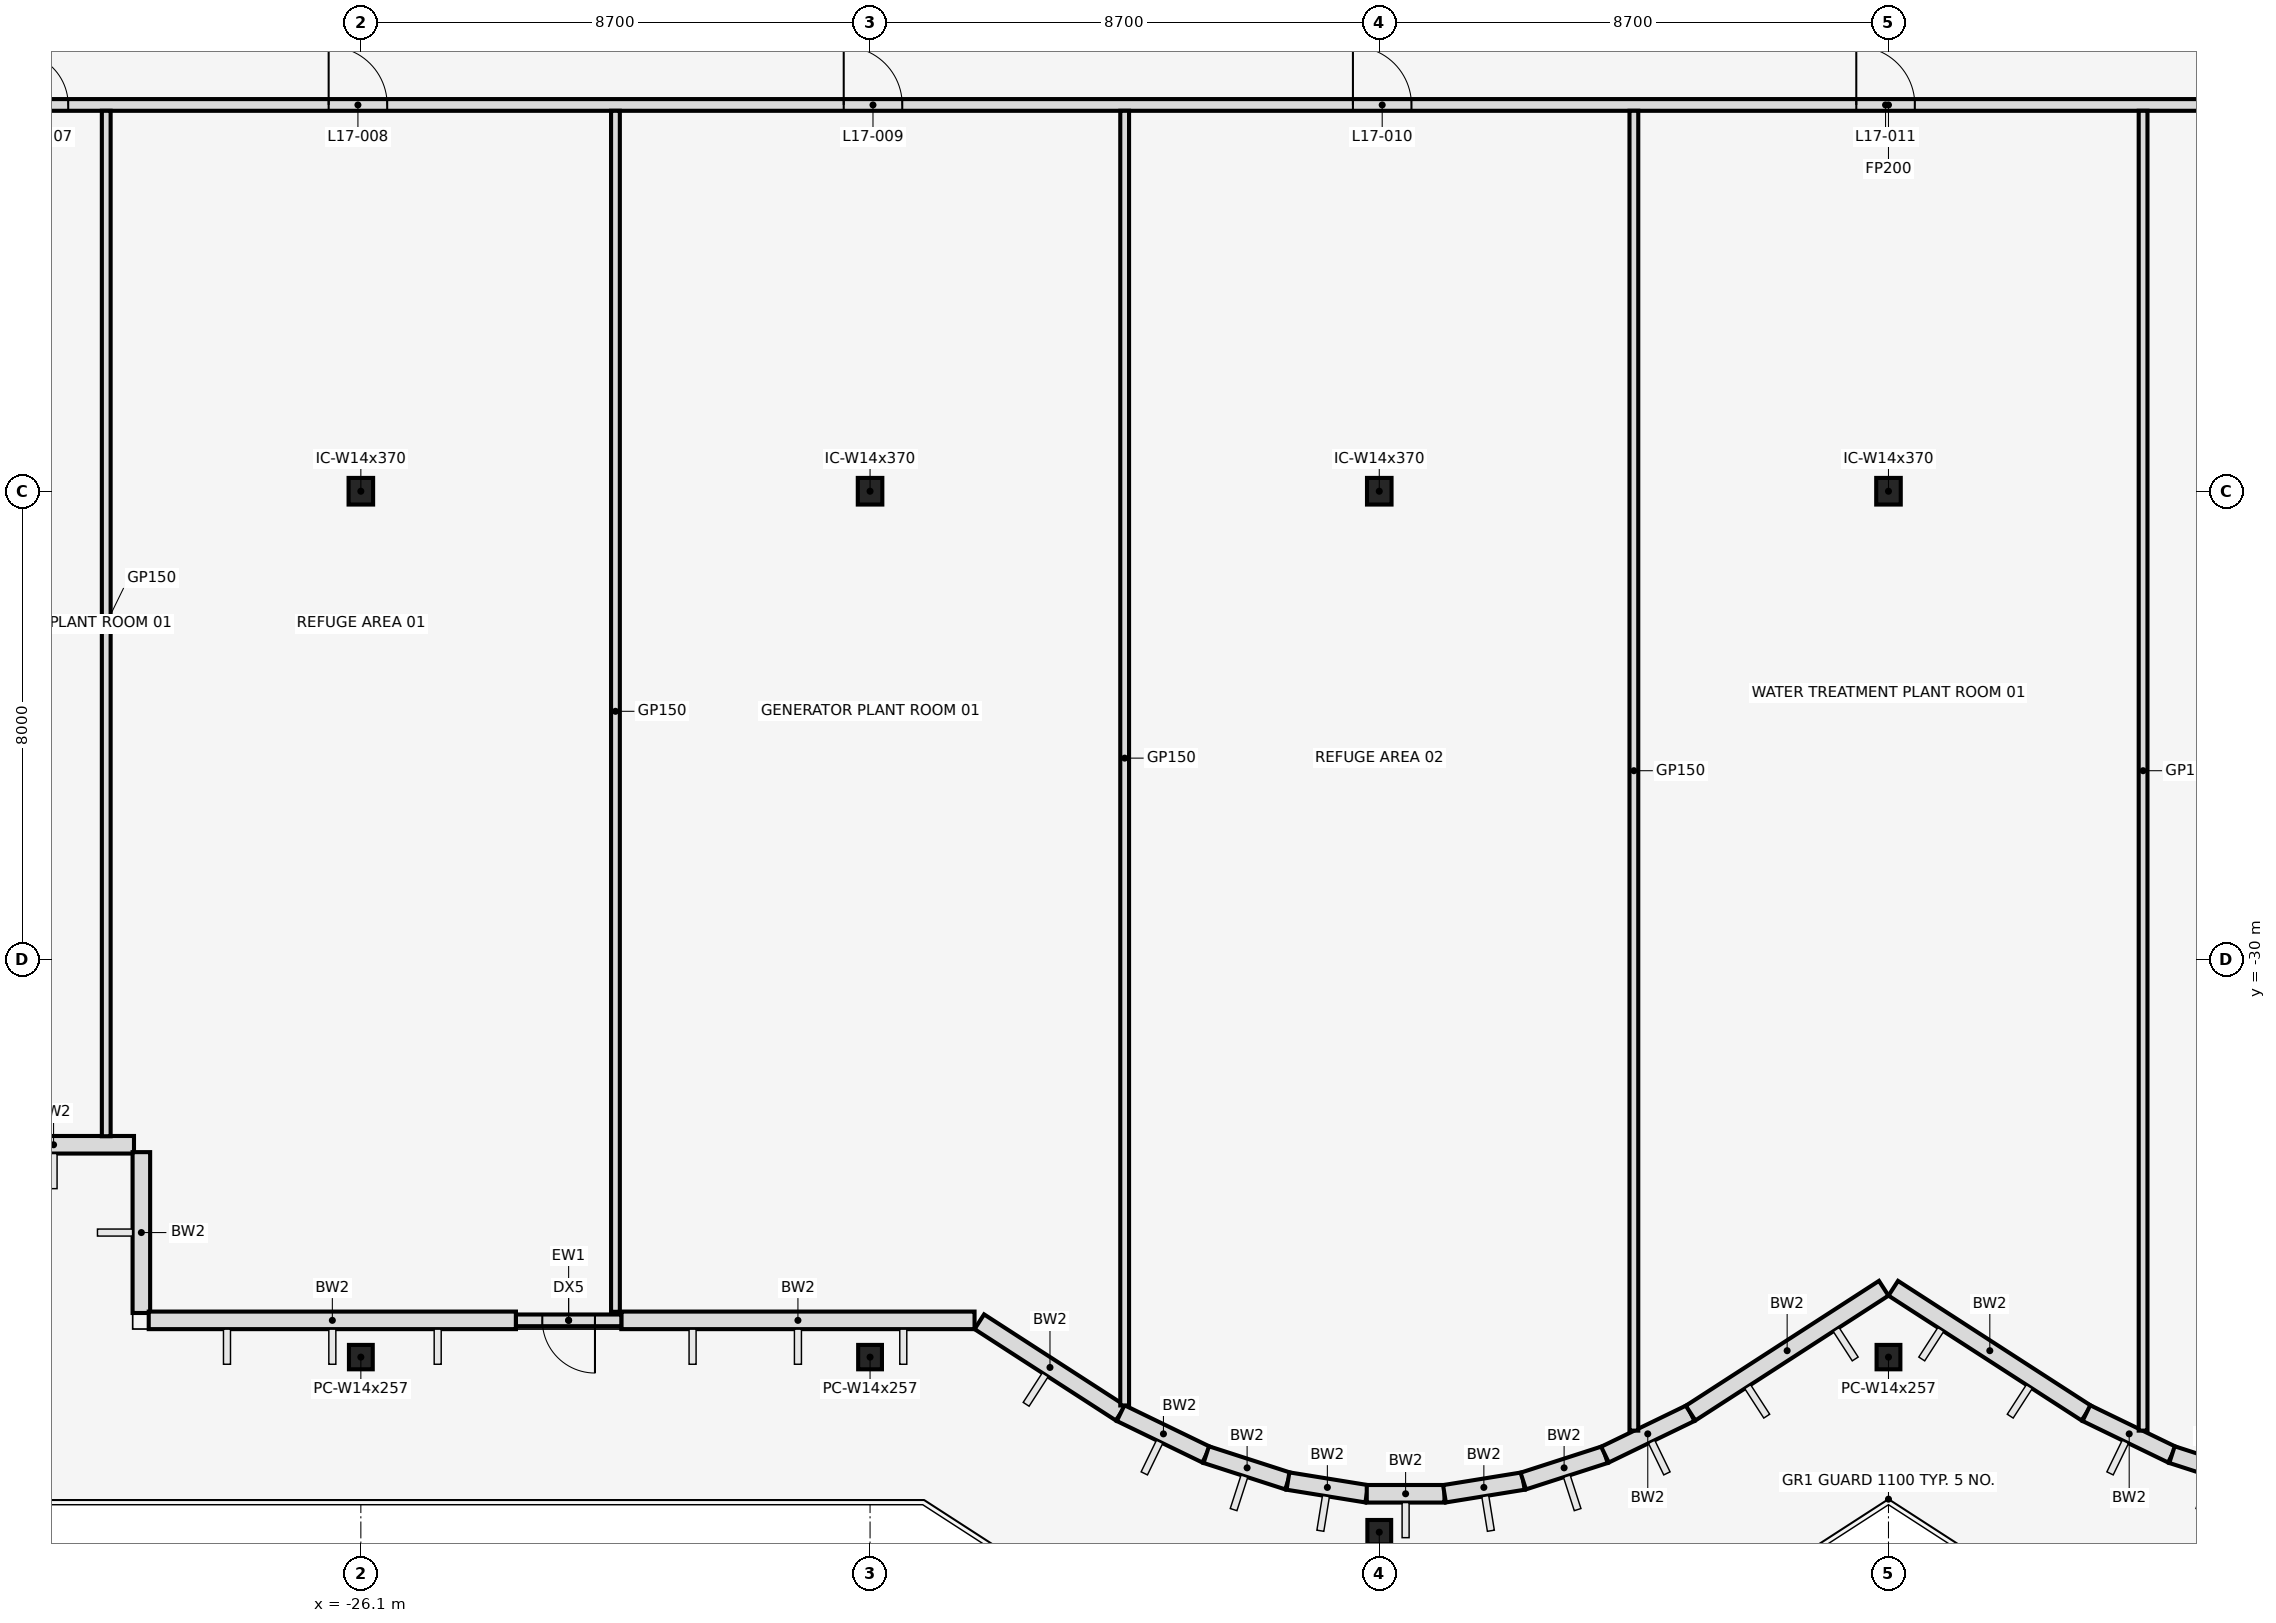
"""IFC4 building model, lengths in metres.
Left out: names, types, materials, properties, quantities, classifications, styles, units other than length and angle.
Written with IfcOpenShell. Run it as: python <this file> out.ifc"""

import sys

from ifc_helpers import new_model, si_unit, direction, frame, frame_2d, origin, origin_2d, place, context, subcontext, project, spatial, rectangle, i_section, extrude, element, fill, save


model = new_model("IFC4")
c1 = context("Model", 3, precision=1e-05, world=origin(), true_north=direction((0.0, 1.0)))
c2 = subcontext(c1, "Body", "Model", "MODEL_VIEW")
j1 = project(units=[si_unit("LENGTHUNIT", "METRE"), si_unit("PLANEANGLEUNIT", "RADIAN")], contexts=[c1])
p1 = place(None, origin())
s1 = spatial("IfcSite", under=j1, at=p1, CompositionType="ELEMENT")
p2 = place(p1, origin())
s2 = spatial("IfcBuilding", under=s1, at=p2, CompositionType="ELEMENT")
p3 = place(p2, frame((0.0, 0.0, 84.5)))
s3 = spatial("IfcBuildingStorey", under=s2, at=p3, CompositionType="ELEMENT", Elevation=84.5)
for number, where, z_axis, x_axis in (
    (1, (-26.1, -36.794, 0.0), (0.0, 0.0, 1.0), (1.0, 0.0, 0.0)),
    (2, (-17.4, -36.794, 0.0), (0.0, 0.0, 1.0), (1.0, 0.0, 0.0)),
    (3, (-8.7, -39.785, 0.0), (0.0, 0.0, 1.0), (1.0, 0.0, 0.0)),
    (4, (0.0, -36.794, 0.0), (0.0, 0.0, 1.0), (1.0, 0.0, 0.0)),
):
    element("IfcColumn", number, at=place(p3, frame(where, z_axis=z_axis, x_axis=x_axis)), inside=s3, PredefinedType="COLUMN", context=c2, shape_type="SweptSolid", body=[
        extrude(i_section(OverallWidth=0.406, OverallDepth=0.417, WebThickness=0.03, FlangeThickness=0.048, at=origin_2d()), origin(), (0.0, 0.0, 1.0), 5.4),
    ])
for number, where, z_axis, x_axis in (
    (5, (-26.1, -22.0, 0.0), (0.0, 0.0, 1.0), (1.0, 0.0, 0.0)),
    (6, (-17.4, -22.0, 0.0), (0.0, 0.0, 1.0), (1.0, 0.0, 0.0)),
    (7, (-8.7, -22.0, 0.0), (0.0, 0.0, 1.0), (1.0, 0.0, 0.0)),
    (8, (0.0, -22.0, 0.0), (0.0, 0.0, 1.0), (1.0, 0.0, 0.0)),
):
    element("IfcColumn", number, at=place(p3, frame(where, z_axis=z_axis, x_axis=x_axis)), inside=s3, PredefinedType="COLUMN", context=c2, shape_type="SweptSolid", body=[
        extrude(i_section(OverallWidth=0.419, OverallDepth=0.455, WebThickness=0.042, FlangeThickness=0.068, at=origin_2d()), origin(), (0.0, 0.0, 1.0), 5.4),
    ])
p4 = place(p3, frame((-32.724, -33.166, 0.0), z_axis=(0.0, 0.0, 1.0), x_axis=(1.0, 0.0, 0.0)))
e9 = element("IfcWall", 9, at=p4, inside=s3, PredefinedType="STANDARD", context=c2, shape_type="SweptSolid", body=[
    extrude(rectangle(XDim=2.748, YDim=0.3, at=frame_2d((1.374, 0.0))), origin(), (0.0, 0.0, 1.0), 4.572),
])
p5 = place(p3, frame((-29.85, -33.292, 0.0), z_axis=(0.0, 0.0, 1.0), x_axis=(0.0, -1.0, 0.0)))
e10 = element("IfcWall", 10, at=p5, inside=s3, PredefinedType="STANDARD", context=c2, shape_type="SweptSolid", body=[
    extrude(rectangle(XDim=2.748, YDim=0.3, at=frame_2d((1.374, 0.0))), origin(), (0.0, 0.0, 1.0), 4.572),
])
p6 = place(p3, frame((-29.724, -36.166, 0.0), z_axis=(0.0, 0.0, 1.0), x_axis=(1.0, 0.0, 0.0)))
e11 = element("IfcWall", 11, at=p6, inside=s3, PredefinedType="STANDARD", context=c2, shape_type="SweptSolid", body=[
    extrude(rectangle(XDim=6.274, YDim=0.3, at=frame_2d((3.137, 0.0))), origin(), (0.0, 0.0, 1.0), 4.572),
])
p7 = place(p3, frame((-21.65, -36.166, 0.0), z_axis=(0.0, 0.0, 1.0), x_axis=(1.0, 0.0, 0.0)))
e12 = element("IfcWall", 12, at=p7, inside=s3, PredefinedType="STANDARD", context=c2, shape_type="SweptSolid", body=[
    extrude(rectangle(XDim=6.035, YDim=0.3, at=frame_2d((3.018, 0.0))), origin(), (0.0, 0.0, 1.0), 4.572),
])
p8 = place(p3, frame((-15.533, -36.19, 0.0), z_axis=(0.0, 0.0, 1.0), x_axis=(0.839779682339, -0.542927329512, 0.0)))
e13 = element("IfcWall", 13, at=p8, inside=s3, PredefinedType="STANDARD", context=c2, shape_type="SweptSolid", body=[
    extrude(rectangle(XDim=2.875, YDim=0.3, at=frame_2d((1.438, 0.0))), origin(), (0.0, 0.0, 1.0), 4.496),
])
p9 = place(p3, frame((-13.119, -37.751, 0.0), z_axis=(0.0, 0.0, 1.0), x_axis=(0.899798026589, -0.436306671214, 0.0)))
e14 = element("IfcWall", 14, at=p9, inside=s3, PredefinedType="STANDARD", context=c2, shape_type="SweptSolid", body=[
    extrude(rectangle(XDim=1.625, YDim=0.3, at=frame_2d((0.813, 0.0))), origin(), (0.0, 0.0, 1.0), 4.496),
])
p10 = place(p3, frame((-11.656, -38.46, 0.0), z_axis=(0.0, 0.0, 1.0), x_axis=(0.951539081691, -0.307527845919, 0.0)))
e15 = element("IfcWall", 15, at=p10, inside=s3, PredefinedType="STANDARD", context=c2, shape_type="SweptSolid", body=[
    extrude(rectangle(XDim=1.467, YDim=0.3, at=frame_2d((0.733, 0.0))), origin(), (0.0, 0.0, 1.0), 5.25),
])
p11 = place(p3, frame((-10.26, -38.911, 0.0), z_axis=(0.0, 0.0, 1.0), x_axis=(0.987194777017, -0.15951950423, 0.0)))
e16 = element("IfcWall", 16, at=p11, inside=s3, PredefinedType="STANDARD", context=c2, shape_type="SweptSolid", body=[
    extrude(rectangle(XDim=1.364, YDim=0.3, at=frame_2d((0.682, 0.0))), origin(), (0.0, 0.0, 1.0), 4.414),
])
p12 = place(p3, frame((-8.914, -39.129, 0.0), z_axis=(0.0, 0.0, 1.0), x_axis=(1.0, 0.0, 0.0)))
e17 = element("IfcWall", 17, at=p12, inside=s3, PredefinedType="STANDARD", context=c2, shape_type="SweptSolid", body=[
    extrude(rectangle(XDim=1.328, YDim=0.3, at=frame_2d((0.664, 0.0))), origin(), (0.0, 0.0, 1.0), 4.414),
])
p13 = place(p3, frame((-7.586, -39.129, 0.0), z_axis=(0.0, 0.0, 1.0), x_axis=(0.987194777017, 0.15951950423, 0.0)))
e18 = element("IfcWall", 18, at=p13, inside=s3, PredefinedType="STANDARD", context=c2, shape_type="SweptSolid", body=[
    extrude(rectangle(XDim=1.364, YDim=0.3, at=frame_2d((0.682, 0.0))), origin(), (0.0, 0.0, 1.0), 5.25),
])
p14 = place(p3, frame((-6.24, -38.911, 0.0), z_axis=(0.0, 0.0, 1.0), x_axis=(0.951539081691, 0.307527845919, 0.0)))
e19 = element("IfcWall", 19, at=p14, inside=s3, PredefinedType="STANDARD", context=c2, shape_type="SweptSolid", body=[
    extrude(rectangle(XDim=1.467, YDim=0.3, at=frame_2d((0.733, 0.0))), origin(), (0.0, 0.0, 1.0), 5.25),
])
p15 = place(p3, frame((-4.844, -38.46, 0.0), z_axis=(0.0, 0.0, 1.0), x_axis=(0.899798026589, 0.436306671214, 0.0)))
e20 = element("IfcWall", 20, at=p15, inside=s3, PredefinedType="STANDARD", context=c2, shape_type="SweptSolid", body=[
    extrude(rectangle(XDim=1.625, YDim=0.3, at=frame_2d((0.813, 0.0))), origin(), (0.0, 0.0, 1.0), 4.496),
])
for number, where, z_axis, x_axis in (
    (21, (-3.381, -37.751, 0.0), (0.0, 0.0, 1.0), (0.84, 0.543, 0.0)),
    (22, (0.081, -35.618, 0.0), (0.0, 0.0, 1.0), (0.84, -0.543, 0.0)),
):
    element("IfcWall", number, at=place(p3, frame(where, z_axis=z_axis, x_axis=x_axis)), inside=s3, PredefinedType="STANDARD", context=c2, shape_type="SweptSolid", body=[
        extrude(rectangle(XDim=3.929, YDim=0.3, at=frame_2d((1.965, 0.0))), origin(), (0.0, 0.0, 1.0), 4.572),
    ])
p16 = place(p3, frame((3.381, -37.751, 0.0), z_axis=(0.0, 0.0, 1.0), x_axis=(0.899798026589, -0.436306671214, 0.0)))
e23 = element("IfcWall", 23, at=p16, inside=s3, PredefinedType="STANDARD", context=c2, shape_type="SweptSolid", body=[
    extrude(rectangle(XDim=1.625, YDim=0.3, at=frame_2d((0.813, 0.0))), origin(), (0.0, 0.0, 1.0), 4.496),
])
p17 = place(p3, frame((4.844, -38.46, 0.0), z_axis=(0.0, 0.0, 1.0), x_axis=(0.951539081691, -0.307527845919, 0.0)))
e24 = element("IfcWall", 24, at=p17, inside=s3, PredefinedType="STANDARD", context=c2, shape_type="SweptSolid", body=[
    extrude(rectangle(XDim=1.467, YDim=0.3, at=frame_2d((0.733, 0.0))), origin(), (0.0, 0.0, 1.0), 5.25),
])
p18 = place(p3, frame((-21.65, -36.166, 0.0), z_axis=(0.0, 0.0, 1.0), x_axis=(-1.0, 0.0, 0.0)))
e25 = element("IfcWall", 25, at=p18, inside=s3, PredefinedType="STANDARD", context=c2, shape_type="SweptSolid", body=[
    extrude(rectangle(XDim=1.8, YDim=0.2, at=frame_2d((0.9, 0.0))), origin(), (0.0, 0.0, 1.0), 5.25),
])
p19 = place(p18, frame((0.45, 0.0, 0.0)))
e26 = element("IfcOpeningElement", 26, at=p19, cuts=e25, PredefinedType="OPENING", context=c2, shape_type="SweptSolid", body=[
    extrude(rectangle(XDim=0.9, YDim=2.1, at=frame_2d((0.45, 1.05))), frame((0.0, 0.112, 0.0), z_axis=(0.0, -1.0, 0.0), x_axis=(1.0, 0.0, 0.0)), (0.0, 0.0, 1.0), 0.224),
])
p20 = place(p3, frame((-32.7, -15.4, 0.0), z_axis=(0.0, 0.0, 1.0), x_axis=(1.0, 0.0, 0.0)))
e27 = element("IfcWall", 27, at=p20, inside=s3, PredefinedType="PARTITIONING", context=c2, shape_type="SweptSolid", body=[
    extrude(rectangle(XDim=65.4, YDim=0.2, at=frame_2d((32.7, 0.0))), origin(), (0.0, 0.0, 1.0), 4.318),
])
p21 = place(p20, frame((0.7, 0.0, 0.0)))
e28 = element("IfcOpeningElement", 28, at=p21, cuts=e27, PredefinedType="OPENING", context=c2, shape_type="SweptSolid", body=[
    extrude(rectangle(XDim=0.9, YDim=2.1, at=frame_2d((0.45, 1.05))), frame((0.0, 0.112, 0.0), z_axis=(0.0, -1.0, 0.0), x_axis=(1.0, 0.0, 0.0)), (0.0, 0.0, 1.0), 0.224),
])
p22 = place(p20, frame((6.05, 0.0, 0.0)))
e29 = element("IfcOpeningElement", 29, at=p22, cuts=e27, PredefinedType="OPENING", context=c2, shape_type="SweptSolid", body=[
    extrude(rectangle(XDim=1.0, YDim=2.1, at=frame_2d((0.5, 1.05))), frame((0.0, 0.112, 0.0), z_axis=(0.0, -1.0, 0.0), x_axis=(1.0, 0.0, 0.0)), (0.0, 0.0, 1.0), 0.224),
])
p23 = place(p20, frame((14.85, 0.0, 0.0)))
e30 = element("IfcOpeningElement", 30, at=p23, cuts=e27, PredefinedType="OPENING", context=c2, shape_type="SweptSolid", body=[
    extrude(rectangle(XDim=1.0, YDim=2.1, at=frame_2d((0.5, 1.05))), frame((0.0, 0.112, 0.0), z_axis=(0.0, -1.0, 0.0), x_axis=(1.0, 0.0, 0.0)), (0.0, 0.0, 1.0), 0.224),
])
p24 = place(p20, frame((23.55, 0.0, 0.0)))
e31 = element("IfcOpeningElement", 31, at=p24, cuts=e27, PredefinedType="OPENING", context=c2, shape_type="SweptSolid", body=[
    extrude(rectangle(XDim=1.0, YDim=2.1, at=frame_2d((0.5, 1.05))), frame((0.0, 0.112, 0.0), z_axis=(0.0, -1.0, 0.0), x_axis=(1.0, 0.0, 0.0)), (0.0, 0.0, 1.0), 0.224),
])
p25 = place(p20, frame((32.15, 0.0, 0.0)))
e32 = element("IfcOpeningElement", 32, at=p25, cuts=e27, PredefinedType="OPENING", context=c2, shape_type="SweptSolid", body=[
    extrude(rectangle(XDim=1.0, YDim=2.1, at=frame_2d((0.5, 1.05))), frame((0.0, 0.112, 0.0), z_axis=(0.0, -1.0, 0.0), x_axis=(1.0, 0.0, 0.0)), (0.0, 0.0, 1.0), 0.224),
])
p26 = place(p20, frame((40.95, 0.0, 0.0)))
e33 = element("IfcOpeningElement", 33, at=p26, cuts=e27, PredefinedType="OPENING", context=c2, shape_type="SweptSolid", body=[
    extrude(rectangle(XDim=1.0, YDim=2.1, at=frame_2d((0.5, 1.05))), frame((0.0, 0.112, 0.0), z_axis=(0.0, -1.0, 0.0), x_axis=(1.0, 0.0, 0.0)), (0.0, 0.0, 1.0), 0.224),
])
p27 = place(p20, frame((49.65, 0.0, 0.0)))
e34 = element("IfcOpeningElement", 34, at=p27, cuts=e27, PredefinedType="OPENING", context=c2, shape_type="SweptSolid", body=[
    extrude(rectangle(XDim=0.9, YDim=2.1, at=frame_2d((0.45, 1.05))), frame((0.0, 0.112, 0.0), z_axis=(0.0, -1.0, 0.0), x_axis=(1.0, 0.0, 0.0)), (0.0, 0.0, 1.0), 0.224),
])
p28 = place(p20, frame((58.35, 0.0, 0.0)))
e35 = element("IfcOpeningElement", 35, at=p28, cuts=e27, PredefinedType="OPENING", context=c2, shape_type="SweptSolid", body=[
    extrude(rectangle(XDim=1.0, YDim=2.1, at=frame_2d((0.5, 1.05))), frame((0.0, 0.112, 0.0), z_axis=(0.0, -1.0, 0.0), x_axis=(1.0, 0.0, 0.0)), (0.0, 0.0, 1.0), 0.224),
])
p29 = place(p20, frame((63.85, 0.0, 0.0)))
e36 = element("IfcOpeningElement", 36, at=p29, cuts=e27, PredefinedType="OPENING", context=c2, shape_type="SweptSolid", body=[
    extrude(rectangle(XDim=0.9, YDim=2.1, at=frame_2d((0.45, 1.05))), frame((0.0, 0.112, 0.0), z_axis=(0.0, -1.0, 0.0), x_axis=(1.0, 0.0, 0.0)), (0.0, 0.0, 1.0), 0.224),
])
p30 = place(p3, frame((-30.45, -33.02, 0.0), z_axis=(0.0, 0.0, 1.0), x_axis=(0.0, 1.0, 0.0)))
e37 = element("IfcWall", 37, at=p30, inside=s3, PredefinedType="PARTITIONING", context=c2, shape_type="SweptSolid", body=[
    extrude(rectangle(XDim=17.52, YDim=0.15, at=frame_2d((8.76, 0.0))), origin(), (0.0, 0.0, 1.0), 4.318),
])
p31 = place(p3, frame((-21.75, -36.02, 0.0), z_axis=(0.0, 0.0, 1.0), x_axis=(0.0, 1.0, 0.0)))
e38 = element("IfcWall", 38, at=p31, inside=s3, PredefinedType="PARTITIONING", context=c2, shape_type="SweptSolid", body=[
    extrude(rectangle(XDim=20.52, YDim=0.15, at=frame_2d((10.26, 0.0))), origin(), (0.0, 0.0, 1.0), 4.318),
])
p32 = place(p3, frame((-13.05, -37.62, 0.0), z_axis=(0.0, 0.0, 1.0), x_axis=(0.0, 1.0, 0.0)))
e39 = element("IfcWall", 39, at=p32, inside=s3, PredefinedType="PARTITIONING", context=c2, shape_type="SweptSolid", body=[
    extrude(rectangle(XDim=22.12, YDim=0.15, at=frame_2d((11.06, 0.0))), origin(), (0.0, 0.0, 1.0), 4.318),
])
for number, where, z_axis, x_axis in (
    (40, (-4.35, -38.05, 0.0), (0.0, 0.0, 1.0), (0.0, 1.0, 0.0)),
    (41, (4.35, -38.05, 0.0), (0.0, 0.0, 1.0), (0.0, 1.0, 0.0)),
):
    element("IfcWall", number, at=place(p3, frame(where, z_axis=z_axis, x_axis=x_axis)), inside=s3, PredefinedType="PARTITIONING", context=c2, shape_type="SweptSolid", body=[
        extrude(rectangle(XDim=22.55, YDim=0.15, at=frame_2d((11.275, 0.0))), origin(), (0.0, 0.0, 1.0), 4.318),
    ])
p33 = place(p19, origin())
e42 = element("IfcDoor", 42, at=p33, inside=s3, OperationType="SINGLE_SWING_LEFT", PredefinedType="DOOR", context=c2, shape_type="SweptSolid", body=[
    extrude(rectangle(XDim=0.9, YDim=2.1, at=frame_2d((0.45, 1.05))), frame((0.0, 0.025, 0.0), z_axis=(0.0, -1.0, 0.0), x_axis=(1.0, 0.0, 0.0)), (0.0, 0.0, 1.0), 0.05),
])
fill(e26, e42)
p34 = place(p21, frame((0.9, 0.0, 0.0), z_axis=(0.0, 0.0, 1.0), x_axis=(-1.0, 0.0, 0.0)))
e43 = element("IfcDoor", 43, at=p34, inside=s3, OperationType="SINGLE_SWING_LEFT", PredefinedType="DOOR", context=c2, shape_type="SweptSolid", body=[
    extrude(rectangle(XDim=0.9, YDim=2.1, at=frame_2d((0.45, 1.05))), frame((0.0, 0.025, 0.0), z_axis=(0.0, -1.0, 0.0), x_axis=(1.0, 0.0, 0.0)), (0.0, 0.0, 1.0), 0.05),
])
fill(e28, e43)
p35 = place(p22, frame((1.0, 0.0, 0.0), z_axis=(0.0, 0.0, 1.0), x_axis=(-1.0, 0.0, 0.0)))
e44 = element("IfcDoor", 44, at=p35, inside=s3, OperationType="SINGLE_SWING_RIGHT", PredefinedType="DOOR", context=c2, shape_type="SweptSolid", body=[
    extrude(rectangle(XDim=1.0, YDim=2.1, at=frame_2d((0.5, 1.05))), frame((0.0, 0.025, 0.0), z_axis=(0.0, -1.0, 0.0), x_axis=(1.0, 0.0, 0.0)), (0.0, 0.0, 1.0), 0.05),
])
fill(e29, e44)
p36 = place(p23, frame((1.0, 0.0, 0.0), z_axis=(0.0, 0.0, 1.0), x_axis=(-1.0, 0.0, 0.0)))
e45 = element("IfcDoor", 45, at=p36, inside=s3, OperationType="SINGLE_SWING_RIGHT", PredefinedType="DOOR", context=c2, shape_type="SweptSolid", body=[
    extrude(rectangle(XDim=1.0, YDim=2.1, at=frame_2d((0.5, 1.05))), frame((0.0, 0.025, 0.0), z_axis=(0.0, -1.0, 0.0), x_axis=(1.0, 0.0, 0.0)), (0.0, 0.0, 1.0), 0.05),
])
fill(e30, e45)
p37 = place(p24, frame((1.0, 0.0, 0.0), z_axis=(0.0, 0.0, 1.0), x_axis=(-1.0, 0.0, 0.0)))
e46 = element("IfcDoor", 46, at=p37, inside=s3, OperationType="SINGLE_SWING_LEFT", PredefinedType="DOOR", context=c2, shape_type="SweptSolid", body=[
    extrude(rectangle(XDim=1.0, YDim=2.1, at=frame_2d((0.5, 1.05))), frame((0.0, 0.025, 0.0), z_axis=(0.0, -1.0, 0.0), x_axis=(1.0, 0.0, 0.0)), (0.0, 0.0, 1.0), 0.05),
])
fill(e31, e46)
p38 = place(p25, frame((1.0, 0.0, 0.0), z_axis=(0.0, 0.0, 1.0), x_axis=(-1.0, 0.0, 0.0)))
e47 = element("IfcDoor", 47, at=p38, inside=s3, OperationType="SINGLE_SWING_RIGHT", PredefinedType="DOOR", context=c2, shape_type="SweptSolid", body=[
    extrude(rectangle(XDim=1.0, YDim=2.1, at=frame_2d((0.5, 1.05))), frame((0.0, 0.025, 0.0), z_axis=(0.0, -1.0, 0.0), x_axis=(1.0, 0.0, 0.0)), (0.0, 0.0, 1.0), 0.05),
])
fill(e32, e47)
save(model, sys.argv[1])
